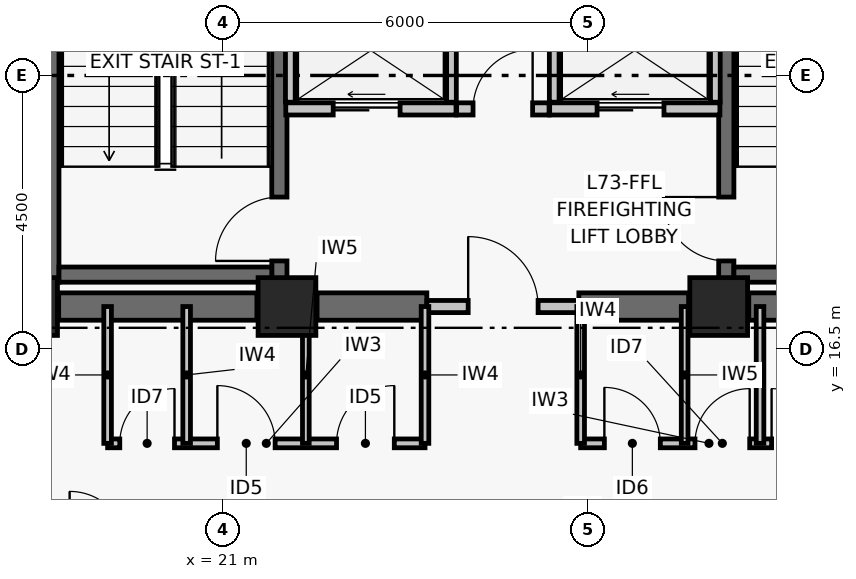
"""IFC4 building model, lengths in metres.
Left out: names, types, materials, properties, quantities, classifications, styles, units other than length and angle.
Written with IfcOpenShell. Run it as: python <this file> out.ifc"""

import sys

from ifc_helpers import new_model, si_unit, direction, frame, frame_2d, origin, origin_2d, place, context, subcontext, project, spatial, rectangle, extrude, element, fill, save


model = new_model("IFC4")
c1 = context("Model", 3, precision=1e-05, world=origin(), true_north=direction((0.0, 1.0)))
c2 = subcontext(c1, "Body", "Model", "MODEL_VIEW")
j1 = project(units=[si_unit("LENGTHUNIT", "METRE"), si_unit("PLANEANGLEUNIT", "RADIAN")], contexts=[c1])
p1 = place(None, origin())
s1 = spatial("IfcSite", under=j1, at=p1, CompositionType="ELEMENT")
p2 = place(p1, origin())
s2 = spatial("IfcBuilding", under=s1, at=p2, CompositionType="ELEMENT")
p3 = place(p2, frame((0.0, 0.0, 288.06)))
s3 = spatial("IfcBuildingStorey", under=s2, at=p3, CompositionType="ELEMENT", Elevation=288.06)
for number, where, z_axis, x_axis in (
    (1, (17.8, 17.2, 0.0), (0.0, 0.0, 1.0), (1.0, 0.0, 0.0)),
    (2, (22.05, 17.2, 0.0), (0.0, 0.0, 1.0), (1.0, 0.0, 0.0)),
    (3, (29.15, 17.2, 0.0), (0.0, 0.0, 1.0), (1.0, 0.0, 0.0)),
):
    element("IfcColumn", number, at=place(p3, frame(where, z_axis=z_axis, x_axis=x_axis)), inside=s3, PredefinedType="COLUMN", context=c2, shape_type="SweptSolid", body=[
        extrude(rectangle(XDim=0.95, YDim=0.95, at=origin_2d()), origin(), (0.0, 0.0, 1.0), 3.72),
    ])
p4 = place(p3, frame((18.295, 17.2, 0.0), z_axis=(0.0, 0.0, 1.0), x_axis=(1.0, 0.0, 0.0)))
e4 = element("IfcWall", 4, at=p4, inside=s3, PredefinedType="SHEAR", context=c2, shape_type="SweptSolid", body=[
    extrude(rectangle(XDim=3.26, YDim=0.45, at=frame_2d((1.63, 0.0))), origin(), (0.0, 0.0, 1.0), 3.5),
])
p5 = place(p3, frame((22.545, 17.2, 0.0), z_axis=(0.0, 0.0, 1.0), x_axis=(1.0, 0.0, 0.0)))
e5 = element("IfcWall", 5, at=p5, inside=s3, PredefinedType="SHEAR", context=c2, shape_type="SweptSolid", body=[
    extrude(rectangle(XDim=1.805, YDim=0.45, at=frame_2d((0.903, 0.0))), origin(), (0.0, 0.0, 1.0), 3.5),
])
p6 = place(p3, frame((26.85, 17.2, 0.0), z_axis=(0.0, 0.0, 1.0), x_axis=(1.0, 0.0, 0.0)))
e6 = element("IfcWall", 6, at=p6, inside=s3, PredefinedType="SHEAR", context=c2, shape_type="SweptSolid", body=[
    extrude(rectangle(XDim=1.805, YDim=0.45, at=frame_2d((0.902, 0.0))), origin(), (0.0, 0.0, 1.0), 3.5),
])
p7 = place(p3, frame((29.645, 17.2, 0.0), z_axis=(0.0, 0.0, 1.0), x_axis=(1.0, 0.0, 0.0)))
e7 = element("IfcWall", 7, at=p7, inside=s3, PredefinedType="SHEAR", context=c2, shape_type="SweptSolid", body=[
    extrude(rectangle(XDim=3.26, YDim=0.45, at=frame_2d((1.63, 0.0))), origin(), (0.0, 0.0, 1.0), 3.5),
])
p8 = place(p3, frame((18.175, 17.6, 0.0), z_axis=(0.0, 0.0, 1.0), x_axis=(0.0, 1.0, 0.0)))
e8 = element("IfcWall", 8, at=p8, inside=s3, PredefinedType="SHEAR", context=c2, shape_type="SweptSolid", body=[
    extrude(rectangle(XDim=8.8, YDim=0.25, at=frame_2d((4.4, 0.0))), origin(), (0.0, 0.0, 1.0), 3.5),
])
p9 = place(p3, frame((21.925, 17.6, 0.0), z_axis=(0.0, 0.0, 1.0), x_axis=(0.0, 1.0, 0.0)))
e9 = element("IfcWall", 9, at=p9, inside=s3, PredefinedType="SHEAR", context=c2, shape_type="SweptSolid", body=[
    extrude(rectangle(XDim=8.8, YDim=0.25, at=frame_2d((4.4, 0.0))), origin(), (0.0, 0.0, 1.0), 3.5),
])
p10 = place(p9, frame((0.35, 0.0, 0.0)))
e10 = element("IfcOpeningElement", 10, at=p10, cuts=e9, PredefinedType="OPENING", context=c2, shape_type="SweptSolid", body=[
    extrude(rectangle(XDim=1.05, YDim=2.08, at=frame_2d((0.525, 1.04))), frame((0.0, 0.135, 0.0), z_axis=(0.0, -1.0, 0.0), x_axis=(1.0, 0.0, 0.0)), (0.0, 0.0, 1.0), 0.27),
])
p11 = place(p3, frame((18.3, 17.725, 0.0), z_axis=(0.0, 0.0, 1.0), x_axis=(1.0, 0.0, 0.0)))
e11 = element("IfcWall", 11, at=p11, inside=s3, PredefinedType="SHEAR", context=c2, shape_type="SweptSolid", body=[
    extrude(rectangle(XDim=3.5, YDim=0.25, at=frame_2d((1.75, 0.0))), origin(), (0.0, 0.0, 1.0), 3.5),
])
p12 = place(p3, frame((29.275, 17.6, 0.0), z_axis=(0.0, 0.0, 1.0), x_axis=(0.0, 1.0, 0.0)))
e12 = element("IfcWall", 12, at=p12, inside=s3, PredefinedType="SHEAR", context=c2, shape_type="SweptSolid", body=[
    extrude(rectangle(XDim=8.8, YDim=0.25, at=frame_2d((4.4, 0.0))), origin(), (0.0, 0.0, 1.0), 3.5),
])
p13 = place(p12, frame((0.35, 0.0, 0.0)))
e13 = element("IfcOpeningElement", 13, at=p13, cuts=e12, PredefinedType="OPENING", context=c2, shape_type="SweptSolid", body=[
    extrude(rectangle(XDim=1.05, YDim=2.08, at=frame_2d((0.525, 1.04))), frame((0.0, 0.135, 0.0), z_axis=(0.0, -1.0, 0.0), x_axis=(1.0, 0.0, 0.0)), (0.0, 0.0, 1.0), 0.27),
])
p14 = place(p3, frame((29.4, 17.725, 0.0), z_axis=(0.0, 0.0, 1.0), x_axis=(1.0, 0.0, 0.0)))
e14 = element("IfcWall", 14, at=p14, inside=s3, PredefinedType="SHEAR", context=c2, shape_type="SweptSolid", body=[
    extrude(rectangle(XDim=3.5, YDim=0.25, at=frame_2d((1.75, 0.0))), origin(), (0.0, 0.0, 1.0), 3.5),
])
p15 = place(p3, frame((24.35, 17.2, 0.0), z_axis=(0.0, 0.0, 1.0), x_axis=(1.0, 0.0, 0.0)))
e15 = element("IfcWall", 15, at=p15, inside=s3, PredefinedType="PARTITIONING", context=c2, shape_type="SweptSolid", body=[
    extrude(rectangle(XDim=2.5, YDim=0.2, at=frame_2d((1.25, 0.0))), origin(), (0.0, 0.0, 1.0), 2.63),
])
p16 = place(p15, frame((0.68, 0.0, 0.0)))
e16 = element("IfcOpeningElement", 16, at=p16, cuts=e15, PredefinedType="OPENING", context=c2, shape_type="SweptSolid", body=[
    extrude(rectangle(XDim=1.15, YDim=2.08, at=frame_2d((0.575, 1.04))), frame((0.0, 0.11, 0.0), z_axis=(0.0, -1.0, 0.0), x_axis=(1.0, 0.0, 0.0)), (0.0, 0.0, 1.0), 0.22),
])
p17 = place(p3, frame((24.84, 20.45, 0.0), z_axis=(0.0, 0.0, 1.0), x_axis=(1.0, 0.0, 0.0)))
e17 = element("IfcWall", 17, at=p17, inside=s3, PredefinedType="PARTITIONING", context=c2, shape_type="SweptSolid", body=[
    extrude(rectangle(XDim=1.52, YDim=0.2, at=frame_2d((0.76, 0.0))), origin(), (0.0, 0.0, 1.0), 3.5),
])
p18 = place(p17, frame((0.27, 0.0, 0.0)))
e18 = element("IfcOpeningElement", 18, at=p18, cuts=e17, PredefinedType="OPENING", context=c2, shape_type="SweptSolid", body=[
    extrude(rectangle(XDim=0.98, YDim=2.06, at=frame_2d((0.49, 1.03))), frame((0.0, 0.11, 0.0), z_axis=(0.0, -1.0, 0.0), x_axis=(1.0, 0.0, 0.0)), (0.0, 0.0, 1.0), 0.22),
])
p19 = place(p3, frame((22.03, 20.45, 0.0), z_axis=(0.0, 0.0, 1.0), x_axis=(1.0, 0.0, 0.0)))
e19 = element("IfcWall", 19, at=p19, inside=s3, PredefinedType="PARTITIONING", context=c2, shape_type="SweptSolid", body=[
    extrude(rectangle(XDim=2.8, YDim=0.2, at=frame_2d((1.4, 0.0))), origin(), (0.0, 0.0, 1.0), 3.5),
])
p20 = place(p19, frame((0.78, 0.0, 0.0)))
e20 = element("IfcOpeningElement", 20, at=p20, cuts=e19, PredefinedType="OPENING", context=c2, shape_type="SweptSolid", body=[
    extrude(rectangle(XDim=1.1, YDim=2.08, at=frame_2d((0.55, 1.04))), frame((0.0, 0.11, 0.0), z_axis=(0.0, -1.0, 0.0), x_axis=(1.0, 0.0, 0.0)), (0.0, 0.0, 1.0), 0.22),
])
p21 = place(p3, frame((26.37, 20.45, 0.0), z_axis=(0.0, 0.0, 1.0), x_axis=(1.0, 0.0, 0.0)))
e21 = element("IfcWall", 21, at=p21, inside=s3, PredefinedType="PARTITIONING", context=c2, shape_type="SweptSolid", body=[
    extrude(rectangle(XDim=2.8, YDim=0.2, at=frame_2d((1.4, 0.0))), origin(), (0.0, 0.0, 1.0), 3.5),
])
p22 = place(p21, frame((0.78, 0.0, 0.0)))
e22 = element("IfcOpeningElement", 22, at=p22, cuts=e21, PredefinedType="OPENING", context=c2, shape_type="SweptSolid", body=[
    extrude(rectangle(XDim=1.1, YDim=2.08, at=frame_2d((0.55, 1.04))), frame((0.0, 0.11, 0.0), z_axis=(0.0, -1.0, 0.0), x_axis=(1.0, 0.0, 0.0)), (0.0, 0.0, 1.0), 0.22),
])
for number, where, z_axis, x_axis in (
    (23, (22.105, 20.56, 0.0), (0.0, 0.0, 1.0), (0.0, 1.0, 0.0)),
    (24, (24.755, 20.56, 0.0), (0.0, 0.0, 1.0), (0.0, 1.0, 0.0)),
):
    element("IfcWall", number, at=place(p3, frame(where, z_axis=z_axis, x_axis=x_axis)), inside=s3, PredefinedType="PARTITIONING", context=c2, shape_type="SweptSolid", body=[
        extrude(rectangle(XDim=1.71, YDim=0.16, at=frame_2d((0.855, 0.0))), origin(), (0.0, 0.0, 1.0), 3.5),
    ])
p23 = place(p3, frame((29.095, 20.56, 0.0), z_axis=(0.0, 0.0, 1.0), x_axis=(0.0, 1.0, 0.0)))
e25 = element("IfcWall", 25, at=p23, inside=s3, PredefinedType="PARTITIONING", context=c2, shape_type="SweptSolid", body=[
    extrude(rectangle(XDim=3.58, YDim=0.16, at=frame_2d((1.79, 0.0))), origin(), (0.0, 0.0, 1.0), 3.5),
])
p24 = place(p3, frame((26.445, 20.56, 0.0), z_axis=(0.0, 0.0, 1.0), x_axis=(0.0, 1.0, 0.0)))
e26 = element("IfcWall", 26, at=p24, inside=s3, PredefinedType="PARTITIONING", context=c2, shape_type="SweptSolid", body=[
    extrude(rectangle(XDim=1.71, YDim=0.16, at=frame_2d((0.855, 0.0))), origin(), (0.0, 0.0, 1.0), 3.5),
])
p25 = place(p3, frame((19.1, 14.95, 0.0), z_axis=(0.0, 0.0, 1.0), x_axis=(1.0, 0.0, 0.0)))
e27 = element("IfcWall", 27, at=p25, inside=s3, PredefinedType="PARTITIONING", context=c2, shape_type="SweptSolid", body=[
    extrude(rectangle(XDim=5.22, YDim=0.145, at=frame_2d((2.61, 0.0))), origin(), (0.0, 0.0, 1.0), 2.83),
])
p26 = place(p25, frame((0.2, 0.0, 0.0)))
e28 = element("IfcOpeningElement", 28, at=p26, cuts=e27, PredefinedType="OPENING", context=c2, shape_type="SweptSolid", body=[
    extrude(rectangle(XDim=0.9, YDim=2.02, at=frame_2d((0.45, 1.01))), frame((0.0, 0.083, 0.0), z_axis=(0.0, -1.0, 0.0), x_axis=(1.0, 0.0, 0.0)), (0.0, 0.0, 1.0), 0.165),
])
p27 = place(p25, frame((1.805, 0.0, 0.0)))
e29 = element("IfcOpeningElement", 29, at=p27, cuts=e27, PredefinedType="OPENING", context=c2, shape_type="SweptSolid", body=[
    extrude(rectangle(XDim=0.95, YDim=2.06, at=frame_2d((0.475, 1.03))), frame((0.0, 0.083, 0.0), z_axis=(0.0, -1.0, 0.0), x_axis=(1.0, 0.0, 0.0)), (0.0, 0.0, 1.0), 0.165),
])
p28 = place(p25, frame((3.765, 0.0, 0.0)))
e30 = element("IfcOpeningElement", 30, at=p28, cuts=e27, PredefinedType="OPENING", context=c2, shape_type="SweptSolid", body=[
    extrude(rectangle(XDim=0.95, YDim=2.06, at=frame_2d((0.475, 1.03))), frame((0.0, 0.083, 0.0), z_axis=(0.0, -1.0, 0.0), x_axis=(1.0, 0.0, 0.0)), (0.0, 0.0, 1.0), 0.165),
])
p29 = place(p3, frame((26.88, 14.95, 0.0), z_axis=(0.0, 0.0, 1.0), x_axis=(1.0, 0.0, 0.0)))
e31 = element("IfcWall", 31, at=p29, inside=s3, PredefinedType="PARTITIONING", context=c2, shape_type="SweptSolid", body=[
    extrude(rectangle(XDim=4.22, YDim=0.145, at=frame_2d((2.11, 0.0))), origin(), (0.0, 0.0, 1.0), 2.98),
])
p30 = place(p29, frame((0.39, 0.0, 0.0)))
e32 = element("IfcOpeningElement", 32, at=p30, cuts=e31, PredefinedType="OPENING", context=c2, shape_type="SweptSolid", body=[
    extrude(rectangle(XDim=0.92, YDim=2.05, at=frame_2d((0.46, 1.025))), frame((0.0, 0.083, 0.0), z_axis=(0.0, -1.0, 0.0), x_axis=(1.0, 0.0, 0.0)), (0.0, 0.0, 1.0), 0.165),
])
p31 = place(p29, frame((1.88, 0.0, 0.0)))
e33 = element("IfcOpeningElement", 33, at=p31, cuts=e31, PredefinedType="OPENING", context=c2, shape_type="SweptSolid", body=[
    extrude(rectangle(XDim=0.9, YDim=2.02, at=frame_2d((0.45, 1.01))), frame((0.0, 0.083, 0.0), z_axis=(0.0, -1.0, 0.0), x_axis=(1.0, 0.0, 0.0)), (0.0, 0.0, 1.0), 0.165),
])
p32 = place(p29, frame((3.14, 0.0, 0.0)))
e34 = element("IfcOpeningElement", 34, at=p32, cuts=e31, PredefinedType="OPENING", context=c2, shape_type="SweptSolid", body=[
    extrude(rectangle(XDim=0.9, YDim=2.02, at=frame_2d((0.45, 1.01))), frame((0.0, 0.083, 0.0), z_axis=(0.0, -1.0, 0.0), x_axis=(1.0, 0.0, 0.0)), (0.0, 0.0, 1.0), 0.165),
])
for number, where, z_axis, x_axis in (
    (35, (19.1, 14.95, 0.0), (0.0, 0.0, 1.0), (0.0, 1.0, 0.0)),
    (36, (20.4, 14.95, 0.0), (0.0, 0.0, 1.0), (0.0, 1.0, 0.0)),
):
    element("IfcWall", number, at=place(p3, frame(where, z_axis=z_axis, x_axis=x_axis)), inside=s3, PredefinedType="PARTITIONING", context=c2, shape_type="SweptSolid", body=[
        extrude(rectangle(XDim=2.25, YDim=0.125, at=frame_2d((1.125, 0.0))), origin(), (0.0, 0.0, 1.0), 2.63),
    ])
p33 = place(p3, frame((22.36, 14.95, 0.0), z_axis=(0.0, 0.0, 1.0), x_axis=(0.0, 1.0, 0.0)))
e37 = element("IfcWall", 37, at=p33, inside=s3, PredefinedType="PARTITIONING", context=c2, shape_type="SweptSolid", body=[
    extrude(rectangle(XDim=2.25, YDim=0.11, at=frame_2d((1.125, 0.0))), origin(), (0.0, 0.0, 1.0), 2.63),
])
for number, where, z_axis, x_axis in (
    (38, (24.32, 14.95, 0.0), (0.0, 0.0, 1.0), (0.0, 1.0, 0.0)),
    (39, (26.88, 14.95, 0.0), (0.0, 0.0, 1.0), (0.0, 1.0, 0.0)),
):
    element("IfcWall", number, at=place(p3, frame(where, z_axis=z_axis, x_axis=x_axis)), inside=s3, PredefinedType="PARTITIONING", context=c2, shape_type="SweptSolid", body=[
        extrude(rectangle(XDim=2.25, YDim=0.125, at=frame_2d((1.125, 0.0))), origin(), (0.0, 0.0, 1.0), 2.63),
    ])
p34 = place(p3, frame((28.59, 14.95, 0.0), z_axis=(0.0, 0.0, 1.0), x_axis=(0.0, 1.0, 0.0)))
e40 = element("IfcWall", 40, at=p34, inside=s3, PredefinedType="PARTITIONING", context=c2, shape_type="SweptSolid", body=[
    extrude(rectangle(XDim=2.25, YDim=0.11, at=frame_2d((1.125, 0.0))), origin(), (0.0, 0.0, 1.0), 2.63),
])
p35 = place(p3, frame((29.83, 14.95, 0.0), z_axis=(0.0, 0.0, 1.0), x_axis=(0.0, 1.0, 0.0)))
e41 = element("IfcWall", 41, at=p35, inside=s3, PredefinedType="PARTITIONING", context=c2, shape_type="SweptSolid", body=[
    extrude(rectangle(XDim=2.25, YDim=0.125, at=frame_2d((1.125, 0.0))), origin(), (0.0, 0.0, 1.0), 2.63),
])
p36 = place(p3, frame((29.168, 13.229, 0.0), z_axis=(0.0, 0.0, 1.0), x_axis=(0.854678044033, 0.519158396876, 0.0)))
e42 = element("IfcWall", 42, at=p36, inside=s3, PredefinedType="PARTITIONING", context=c2, shape_type="SweptSolid", body=[
    extrude(rectangle(XDim=2.368, YDim=0.145, at=frame_2d((1.184, 0.0))), origin(), (0.0, 0.0, 1.0), 3.5),
])
p37 = place(p10, origin())
e43 = element("IfcDoor", 43, at=p37, inside=s3, OperationType="SINGLE_SWING_LEFT", PredefinedType="DOOR", context=c2, shape_type="SweptSolid", body=[
    extrude(rectangle(XDim=1.05, YDim=2.08, at=frame_2d((0.525, 1.04))), frame((0.0, 0.025, 0.0), z_axis=(0.0, -1.0, 0.0), x_axis=(1.0, 0.0, 0.0)), (0.0, 0.0, 1.0), 0.05),
])
fill(e10, e43)
p38 = place(p13, origin())
e44 = element("IfcDoor", 44, at=p38, inside=s3, OperationType="SINGLE_SWING_RIGHT", PredefinedType="DOOR", context=c2, shape_type="SweptSolid", body=[
    extrude(rectangle(XDim=1.05, YDim=2.08, at=frame_2d((0.525, 1.04))), frame((0.0, 0.025, 0.0), z_axis=(0.0, -1.0, 0.0), x_axis=(1.0, 0.0, 0.0)), (0.0, 0.0, 1.0), 0.05),
])
fill(e13, e44)
p39 = place(p16, origin())
e45 = element("IfcDoor", 45, at=p39, inside=s3, OperationType="SINGLE_SWING_LEFT", PredefinedType="DOOR", context=c2, shape_type="SweptSolid", body=[
    extrude(rectangle(XDim=1.15, YDim=2.08, at=frame_2d((0.575, 1.04))), frame((0.0, 0.025, 0.0), z_axis=(0.0, -1.0, 0.0), x_axis=(1.0, 0.0, 0.0)), (0.0, 0.0, 1.0), 0.05),
])
fill(e16, e45)
p40 = place(p18, origin())
e46 = element("IfcDoor", 46, at=p40, inside=s3, OperationType="SINGLE_SWING_RIGHT", PredefinedType="DOOR", context=c2, shape_type="SweptSolid", body=[
    extrude(rectangle(XDim=0.98, YDim=2.06, at=frame_2d((0.49, 1.03))), frame((0.0, 0.025, 0.0), z_axis=(0.0, -1.0, 0.0), x_axis=(1.0, 0.0, 0.0)), (0.0, 0.0, 1.0), 0.05),
])
fill(e18, e46)
p41 = place(p20, origin())
e47 = element("IfcDoor", 47, at=p41, inside=s3, OperationType="DOUBLE_DOOR_SLIDING", PredefinedType="DOOR", context=c2, shape_type="SweptSolid", body=[
    extrude(rectangle(XDim=1.1, YDim=2.08, at=frame_2d((0.55, 1.04))), frame((0.0, 0.025, 0.0), z_axis=(0.0, -1.0, 0.0), x_axis=(1.0, 0.0, 0.0)), (0.0, 0.0, 1.0), 0.05),
])
fill(e20, e47)
p42 = place(p22, origin())
e48 = element("IfcDoor", 48, at=p42, inside=s3, OperationType="DOUBLE_DOOR_SLIDING", PredefinedType="DOOR", context=c2, shape_type="SweptSolid", body=[
    extrude(rectangle(XDim=1.1, YDim=2.08, at=frame_2d((0.55, 1.04))), frame((0.0, 0.025, 0.0), z_axis=(0.0, -1.0, 0.0), x_axis=(1.0, 0.0, 0.0)), (0.0, 0.0, 1.0), 0.05),
])
fill(e22, e48)
p43 = place(p26, origin())
e49 = element("IfcDoor", 49, at=p43, inside=s3, OperationType="SINGLE_SWING_RIGHT", PredefinedType="DOOR", context=c2, shape_type="SweptSolid", body=[
    extrude(rectangle(XDim=0.9, YDim=2.02, at=frame_2d((0.45, 1.01))), frame((0.0, 0.025, 0.0), z_axis=(0.0, -1.0, 0.0), x_axis=(1.0, 0.0, 0.0)), (0.0, 0.0, 1.0), 0.05),
])
fill(e28, e49)
p44 = place(p27, origin())
e50 = element("IfcDoor", 50, at=p44, inside=s3, OperationType="SINGLE_SWING_LEFT", PredefinedType="DOOR", context=c2, shape_type="SweptSolid", body=[
    extrude(rectangle(XDim=0.95, YDim=2.06, at=frame_2d((0.475, 1.03))), frame((0.0, 0.025, 0.0), z_axis=(0.0, -1.0, 0.0), x_axis=(1.0, 0.0, 0.0)), (0.0, 0.0, 1.0), 0.05),
])
fill(e29, e50)
p45 = place(p28, origin())
e51 = element("IfcDoor", 51, at=p45, inside=s3, OperationType="SINGLE_SWING_RIGHT", PredefinedType="DOOR", context=c2, shape_type="SweptSolid", body=[
    extrude(rectangle(XDim=0.95, YDim=2.06, at=frame_2d((0.475, 1.03))), frame((0.0, 0.025, 0.0), z_axis=(0.0, -1.0, 0.0), x_axis=(1.0, 0.0, 0.0)), (0.0, 0.0, 1.0), 0.05),
])
fill(e30, e51)
p46 = place(p30, origin())
e52 = element("IfcDoor", 52, at=p46, inside=s3, OperationType="SINGLE_SWING_LEFT", PredefinedType="DOOR", context=c2, shape_type="SweptSolid", body=[
    extrude(rectangle(XDim=0.92, YDim=2.05, at=frame_2d((0.46, 1.025))), frame((0.0, 0.025, 0.0), z_axis=(0.0, -1.0, 0.0), x_axis=(1.0, 0.0, 0.0)), (0.0, 0.0, 1.0), 0.05),
])
fill(e32, e52)
p47 = place(p31, origin())
e53 = element("IfcDoor", 53, at=p47, inside=s3, OperationType="SINGLE_SWING_RIGHT", PredefinedType="DOOR", context=c2, shape_type="SweptSolid", body=[
    extrude(rectangle(XDim=0.9, YDim=2.02, at=frame_2d((0.45, 1.01))), frame((0.0, 0.025, 0.0), z_axis=(0.0, -1.0, 0.0), x_axis=(1.0, 0.0, 0.0)), (0.0, 0.0, 1.0), 0.05),
])
fill(e33, e53)
p48 = place(p32, origin())
e54 = element("IfcDoor", 54, at=p48, inside=s3, OperationType="SINGLE_SWING_LEFT", PredefinedType="DOOR", context=c2, shape_type="SweptSolid", body=[
    extrude(rectangle(XDim=0.9, YDim=2.02, at=frame_2d((0.45, 1.01))), frame((0.0, 0.025, 0.0), z_axis=(0.0, -1.0, 0.0), x_axis=(1.0, 0.0, 0.0)), (0.0, 0.0, 1.0), 0.05),
])
fill(e34, e54)
save(model, sys.argv[1])
